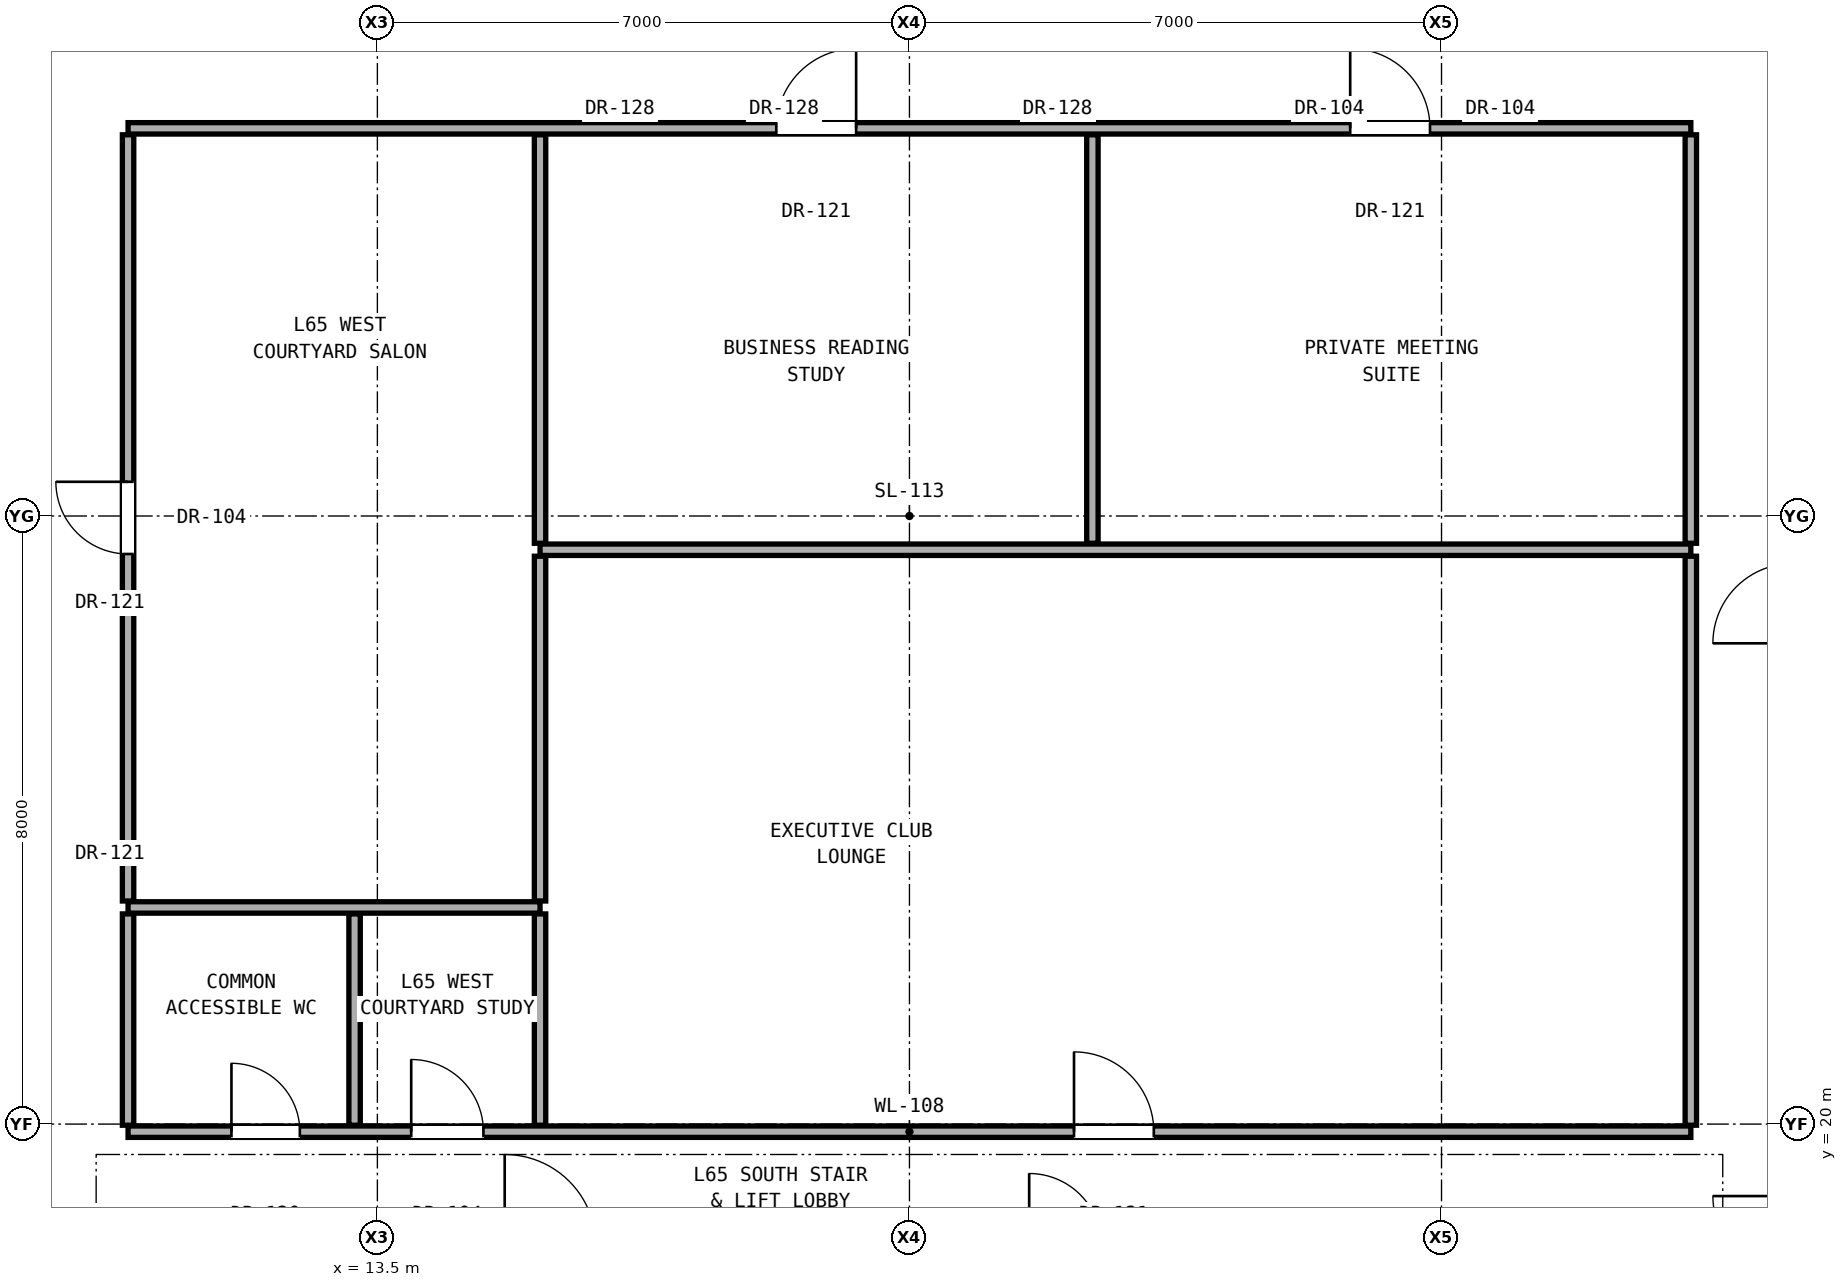
"""IFC4 building model, lengths in metres.
Left out: names, types, materials, properties, quantities, classifications, styles, units other than length and angle.
Written with IfcOpenShell. Run it as: python <this file> out.ifc"""

import sys

from ifc_helpers import new_model, si_unit, direction, frame, frame_2d, origin, place, context, subcontext, project, spatial, rectangle, extrude, element, fill, save


model = new_model("IFC4")
c1 = context("Model", 3, precision=1e-05, world=origin(), true_north=direction((0.0, 1.0)))
c2 = subcontext(c1, "Body", "Model", "MODEL_VIEW")
j1 = project(units=[si_unit("LENGTHUNIT", "METRE"), si_unit("PLANEANGLEUNIT", "RADIAN")], contexts=[c1])
p1 = place(None, origin())
s1 = spatial("IfcSite", under=j1, at=p1, CompositionType="ELEMENT")
p2 = place(p1, origin())
s2 = spatial("IfcBuilding", under=s1, at=p2, CompositionType="ELEMENT")
p3 = place(p2, frame((0.0, 0.0, 229.3)))
s3 = spatial("IfcBuildingStorey", under=s2, at=p3, CompositionType="ELEMENT", Elevation=229.3)
p4 = place(p3, frame((10.22, 19.9, 0.0), z_axis=(0.0, 0.0, 1.0), x_axis=(1.0, 0.0, 0.0)))
e1 = element("IfcWall", 1, at=p4, inside=s3, PredefinedType="PARTITIONING", context=c2, shape_type="SweptSolid", body=[
    extrude(rectangle(XDim=20.56, YDim=0.15, at=frame_2d((10.28, 0.0))), origin(), (0.0, 0.0, 1.0), 2.236),
])
p5 = place(p4, frame((1.36, 0.0, 0.0)))
e2 = element("IfcOpeningElement", 2, at=p5, cuts=e1, PredefinedType="OPENING", context=c2, shape_type="SweptSolid", body=[
    extrude(rectangle(XDim=0.9, YDim=2.1, at=frame_2d((0.45, 1.05))), frame((0.0, 0.085, 0.0), z_axis=(0.0, -1.0, 0.0), x_axis=(1.0, 0.0, 0.0)), (0.0, 0.0, 1.0), 0.17),
])
p6 = place(p4, frame((3.725, 0.0, 0.0)))
e3 = element("IfcOpeningElement", 3, at=p6, cuts=e1, PredefinedType="OPENING", context=c2, shape_type="SweptSolid", body=[
    extrude(rectangle(XDim=0.95, YDim=2.15, at=frame_2d((0.475, 1.075))), frame((0.0, 0.085, 0.0), z_axis=(0.0, -1.0, 0.0), x_axis=(1.0, 0.0, 0.0)), (0.0, 0.0, 1.0), 0.17),
])
p7 = place(p4, frame((12.445, 0.0, 0.0)))
e4 = element("IfcOpeningElement", 4, at=p7, cuts=e1, PredefinedType="OPENING", context=c2, shape_type="SweptSolid", body=[
    extrude(rectangle(XDim=1.05, YDim=2.2, at=frame_2d((0.525, 1.1))), frame((0.0, 0.085, 0.0), z_axis=(0.0, -1.0, 0.0), x_axis=(1.0, 0.0, 0.0)), (0.0, 0.0, 1.0), 0.17),
])
p8 = place(p3, frame((10.22, 22.85, 0.0), z_axis=(0.0, 0.0, 1.0), x_axis=(1.0, 0.0, 0.0)))
e5 = element("IfcWall", 5, at=p8, inside=s3, PredefinedType="PARTITIONING", context=c2, shape_type="SweptSolid", body=[
    extrude(rectangle(XDim=5.42, YDim=0.15, at=frame_2d((2.71, 0.0))), origin(), (0.0, 0.0, 1.0), 2.236),
])
p9 = place(p3, frame((15.64, 27.556, 0.0), z_axis=(0.0, 0.0, 1.0), x_axis=(1.0, 0.0, 0.0)))
e6 = element("IfcWall", 6, at=p9, inside=s3, PredefinedType="PARTITIONING", context=c2, shape_type="SweptSolid", body=[
    extrude(rectangle(XDim=15.14, YDim=0.15, at=frame_2d((7.57, 0.0))), origin(), (0.0, 0.0, 1.0), 2.236),
])
p10 = place(p3, frame((10.22, 33.1, 0.0), z_axis=(0.0, 0.0, 1.0), x_axis=(1.0, 0.0, 0.0)))
e7 = element("IfcWall", 7, at=p10, inside=s3, PredefinedType="PARTITIONING", context=c2, shape_type="SweptSolid", body=[
    extrude(rectangle(XDim=20.56, YDim=0.15, at=frame_2d((10.28, 0.0))), origin(), (0.0, 0.0, 1.0), 2.236),
])
p11 = place(p10, frame((8.529, 0.0, 0.0)))
e8 = element("IfcOpeningElement", 8, at=p11, cuts=e7, PredefinedType="OPENING", context=c2, shape_type="SweptSolid", body=[
    extrude(rectangle(XDim=1.05, YDim=2.2, at=frame_2d((0.525, 1.1))), frame((0.0, 0.085, 0.0), z_axis=(0.0, -1.0, 0.0), x_axis=(1.0, 0.0, 0.0)), (0.0, 0.0, 1.0), 0.17),
])
p12 = place(p10, frame((16.079, 0.0, 0.0)))
e9 = element("IfcOpeningElement", 9, at=p12, cuts=e7, PredefinedType="OPENING", context=c2, shape_type="SweptSolid", body=[
    extrude(rectangle(XDim=1.05, YDim=2.2, at=frame_2d((0.525, 1.1))), frame((0.0, 0.085, 0.0), z_axis=(0.0, -1.0, 0.0), x_axis=(1.0, 0.0, 0.0)), (0.0, 0.0, 1.0), 0.17),
])
p13 = place(p3, frame((10.22, 19.985, 0.0), z_axis=(0.0, 0.0, 1.0), x_axis=(0.0, 1.0, 0.0)))
e10 = element("IfcWall", 10, at=p13, inside=s3, PredefinedType="PARTITIONING", context=c2, shape_type="SweptSolid", body=[
    extrude(rectangle(XDim=2.78, YDim=0.15, at=frame_2d((1.39, 0.0))), origin(), (0.0, 0.0, 1.0), 3.1),
])
p14 = place(p3, frame((10.22, 22.935, 0.0), z_axis=(0.0, 0.0, 1.0), x_axis=(0.0, 1.0, 0.0)))
e11 = element("IfcWall", 11, at=p14, inside=s3, PredefinedType="PARTITIONING", context=c2, shape_type="SweptSolid", body=[
    extrude(rectangle(XDim=10.08, YDim=0.15, at=frame_2d((5.04, 0.0))), origin(), (0.0, 0.0, 1.0), 2.396),
])
p15 = place(p14, frame((4.565, 0.0, 0.0)))
e12 = element("IfcOpeningElement", 12, at=p15, cuts=e11, PredefinedType="OPENING", context=c2, shape_type="SweptSolid", body=[
    extrude(rectangle(XDim=0.95, YDim=2.15, at=frame_2d((0.475, 1.075))), frame((0.0, 0.085, 0.0), z_axis=(0.0, -1.0, 0.0), x_axis=(1.0, 0.0, 0.0)), (0.0, 0.0, 1.0), 0.17),
])
p16 = place(p3, frame((13.2, 19.985, 0.0), z_axis=(0.0, 0.0, 1.0), x_axis=(0.0, 1.0, 0.0)))
e13 = element("IfcWall", 13, at=p16, inside=s3, PredefinedType="PARTITIONING", context=c2, shape_type="SweptSolid", body=[
    extrude(rectangle(XDim=2.78, YDim=0.15, at=frame_2d((1.39, 0.0))), origin(), (0.0, 0.0, 1.0), 3.1),
])
p17 = place(p3, frame((15.64, 19.985, 0.0), z_axis=(0.0, 0.0, 1.0), x_axis=(0.0, 1.0, 0.0)))
e14 = element("IfcWall", 14, at=p17, inside=s3, PredefinedType="PARTITIONING", context=c2, shape_type="SweptSolid", body=[
    extrude(rectangle(XDim=2.78, YDim=0.15, at=frame_2d((1.39, 0.0))), origin(), (0.0, 0.0, 1.0), 2.675),
])
p18 = place(p3, frame((15.64, 22.935, 0.0), z_axis=(0.0, 0.0, 1.0), x_axis=(0.0, 1.0, 0.0)))
e15 = element("IfcWall", 15, at=p18, inside=s3, PredefinedType="PARTITIONING", context=c2, shape_type="SweptSolid", body=[
    extrude(rectangle(XDim=4.536, YDim=0.15, at=frame_2d((2.268, 0.0))), origin(), (0.0, 0.0, 1.0), 2.236),
])
for number, where, z_axis, x_axis in (
    (16, (15.64, 27.641, 0.0), (0.0, 0.0, 1.0), (0.0, 1.0, 0.0)),
    (17, (22.907, 27.641, 0.0), (0.0, 0.0, 1.0), (0.0, 1.0, 0.0)),
):
    element("IfcWall", number, at=place(p3, frame(where, z_axis=z_axis, x_axis=x_axis)), inside=s3, PredefinedType="PARTITIONING", context=c2, shape_type="SweptSolid", body=[
        extrude(rectangle(XDim=5.374, YDim=0.15, at=frame_2d((2.687, 0.0))), origin(), (0.0, 0.0, 1.0), 2.236),
    ])
p19 = place(p3, frame((30.78, 19.985, 0.0), z_axis=(0.0, 0.0, 1.0), x_axis=(0.0, 1.0, 0.0)))
e18 = element("IfcWall", 18, at=p19, inside=s3, PredefinedType="PARTITIONING", context=c2, shape_type="SweptSolid", body=[
    extrude(rectangle(XDim=7.486, YDim=0.15, at=frame_2d((3.743, 0.0))), origin(), (0.0, 0.0, 1.0), 2.396),
])
p20 = place(p3, frame((30.78, 27.641, 0.0), z_axis=(0.0, 0.0, 1.0), x_axis=(0.0, 1.0, 0.0)))
e19 = element("IfcWall", 19, at=p20, inside=s3, PredefinedType="PARTITIONING", context=c2, shape_type="SweptSolid", body=[
    extrude(rectangle(XDim=5.374, YDim=0.15, at=frame_2d((2.687, 0.0))), origin(), (0.0, 0.0, 1.0), 2.396),
])
p21 = place(p5, origin())
e20 = element("IfcDoor", 20, at=p21, inside=s3, OperationType="SINGLE_SWING_LEFT", PredefinedType="DOOR", context=c2, shape_type="SweptSolid", body=[
    extrude(rectangle(XDim=0.9, YDim=2.1, at=frame_2d((0.45, 1.05))), frame((0.0, 0.025, 0.0), z_axis=(0.0, -1.0, 0.0), x_axis=(1.0, 0.0, 0.0)), (0.0, 0.0, 1.0), 0.05),
])
fill(e2, e20)
p22 = place(p6, origin())
e21 = element("IfcDoor", 21, at=p22, inside=s3, OperationType="SINGLE_SWING_LEFT", PredefinedType="DOOR", context=c2, shape_type="SweptSolid", body=[
    extrude(rectangle(XDim=0.95, YDim=2.15, at=frame_2d((0.475, 1.075))), frame((0.0, 0.025, 0.0), z_axis=(0.0, -1.0, 0.0), x_axis=(1.0, 0.0, 0.0)), (0.0, 0.0, 1.0), 0.05),
])
fill(e3, e21)
p23 = place(p15, origin())
e22 = element("IfcDoor", 22, at=p23, inside=s3, OperationType="SINGLE_SWING_RIGHT", PredefinedType="DOOR", context=c2, shape_type="SweptSolid", body=[
    extrude(rectangle(XDim=0.95, YDim=2.15, at=frame_2d((0.475, 1.075))), frame((0.0, 0.025, 0.0), z_axis=(0.0, -1.0, 0.0), x_axis=(1.0, 0.0, 0.0)), (0.0, 0.0, 1.0), 0.05),
])
fill(e12, e22)
p24 = place(p7, origin())
e23 = element("IfcDoor", 23, at=p24, inside=s3, OperationType="SINGLE_SWING_LEFT", PredefinedType="DOOR", context=c2, shape_type="SweptSolid", body=[
    extrude(rectangle(XDim=1.05, YDim=2.2, at=frame_2d((0.525, 1.1))), frame((0.0, 0.025, 0.0), z_axis=(0.0, -1.0, 0.0), x_axis=(1.0, 0.0, 0.0)), (0.0, 0.0, 1.0), 0.05),
])
fill(e4, e23)
p25 = place(p11, origin())
e24 = element("IfcDoor", 24, at=p25, inside=s3, OperationType="SINGLE_SWING_RIGHT", PredefinedType="DOOR", context=c2, shape_type="SweptSolid", body=[
    extrude(rectangle(XDim=1.05, YDim=2.2, at=frame_2d((0.525, 1.1))), frame((0.0, 0.025, 0.0), z_axis=(0.0, -1.0, 0.0), x_axis=(1.0, 0.0, 0.0)), (0.0, 0.0, 1.0), 0.05),
])
fill(e8, e24)
p26 = place(p12, origin())
e25 = element("IfcDoor", 25, at=p26, inside=s3, OperationType="SINGLE_SWING_LEFT", PredefinedType="DOOR", context=c2, shape_type="SweptSolid", body=[
    extrude(rectangle(XDim=1.05, YDim=2.2, at=frame_2d((0.525, 1.1))), frame((0.0, 0.025, 0.0), z_axis=(0.0, -1.0, 0.0), x_axis=(1.0, 0.0, 0.0)), (0.0, 0.0, 1.0), 0.05),
])
fill(e9, e25)
save(model, sys.argv[1])
